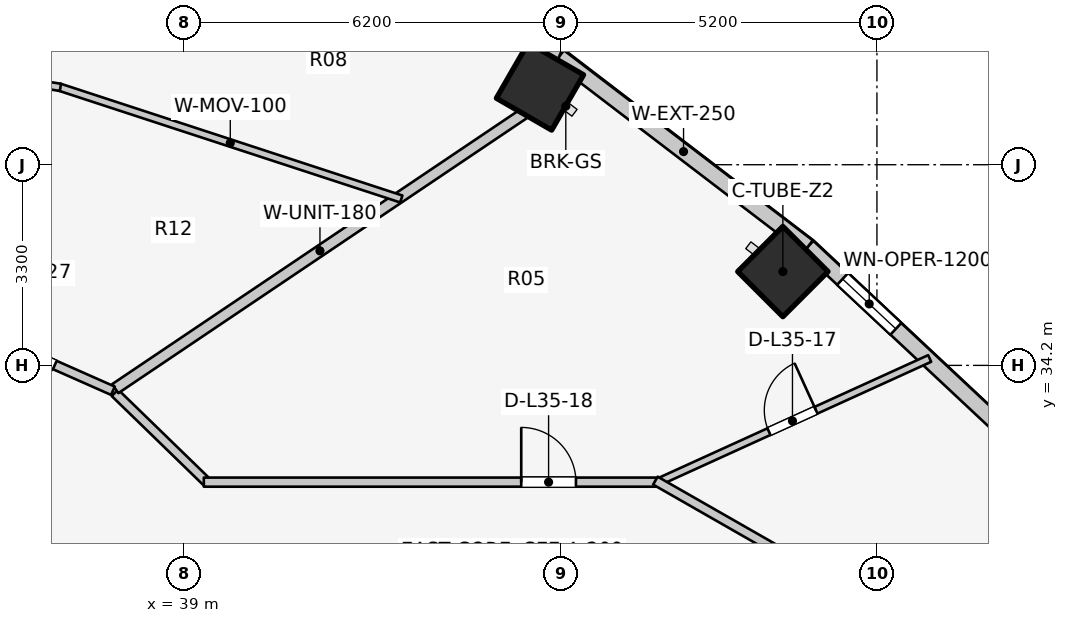
"""IFC4 building model, lengths in metres.
Left out: names, types, materials, properties, quantities, classifications, styles, units other than length and angle.
Written with IfcOpenShell. Run it as: python <this file> out.ifc"""

import sys

from ifc_helpers import new_model, si_unit, direction, frame, frame_2d, origin, origin_2d, place, context, subcontext, project, spatial, rectangle, extrude, element, fill, save


model = new_model("IFC4")
c1 = context("Model", 3, precision=1e-05, world=origin(), true_north=direction((0.0, 1.0)))
c2 = subcontext(c1, "Body", "Model", "MODEL_VIEW")
j1 = project(units=[si_unit("LENGTHUNIT", "METRE"), si_unit("PLANEANGLEUNIT", "RADIAN")], contexts=[c1])
p1 = place(None, origin())
s1 = spatial("IfcSite", under=j1, at=p1, CompositionType="ELEMENT")
p2 = place(p1, origin())
s2 = spatial("IfcBuilding", under=s1, at=p2, CompositionType="ELEMENT")
p3 = place(p2, frame((0.0, 0.0, 116.6)))
s3 = spatial("IfcBuildingStorey", under=s2, at=p3, CompositionType="ELEMENT", Elevation=116.6)
for number, where, z_axis, x_axis in (
    (1, (48.853, 35.743, 0.0), (0.0, 0.0, 1.0), (0.707, 0.707, 0.0)),
    (2, (44.858, 38.786, 0.0), (0.0, 0.0, 1.0), (0.5, 0.866, 0.0)),
):
    element("IfcColumn", number, at=place(p3, frame(where, z_axis=z_axis, x_axis=x_axis)), inside=s3, PredefinedType="COLUMN", context=c2, shape_type="SweptSolid", body=[
        extrude(rectangle(XDim=1.05, YDim=1.05, at=origin_2d()), origin(), (0.0, 0.0, 1.0), 3.1),
    ])
p4 = place(p3, frame((52.821, 32.827, 0.0), z_axis=(0.0, 0.0, 1.0), x_axis=(-0.730162452258, 0.68327358599, 0.0)))
e3 = element("IfcWall", 3, at=p4, inside=s3, PredefinedType="STANDARD", context=c2, shape_type="SweptSolid", body=[
    extrude(rectangle(XDim=4.868, YDim=0.26, at=frame_2d((2.434, 0.0))), origin(), (0.0, 0.0, 1.0), 2.85),
])
p5 = place(p4, frame((2.889, 0.0, 0.75)))
e4 = element("IfcOpeningElement", 4, at=p5, cuts=e3, PredefinedType="OPENING", context=c2, shape_type="SweptSolid", body=[
    extrude(rectangle(XDim=1.2, YDim=1.5, at=frame_2d((0.6, 0.75))), frame((0.0, 0.14, 0.0), z_axis=(0.0, -1.0, 0.0), x_axis=(1.0, 0.0, 0.0)), (0.0, 0.0, 1.0), 0.28),
])
p6 = place(p3, frame((49.266, 36.153, 0.0), z_axis=(0.0, 0.0, 1.0), x_axis=(-0.794809810864, 0.606858603427, 0.0)))
e5 = element("IfcWall", 5, at=p6, inside=s3, PredefinedType="STANDARD", context=c2, shape_type="SweptSolid", body=[
    extrude(rectangle(XDim=5.149, YDim=0.26, at=frame_2d((2.575, 0.0))), origin(), (0.0, 0.0, 1.0), 2.85),
])
p7 = place(p3, frame((45.173, 39.278, 0.0), z_axis=(0.0, 0.0, 1.0), x_axis=(-0.914336605747, 0.404955023911, 0.0)))
e6 = element("IfcWall", 6, at=p7, inside=s3, PredefinedType="STANDARD", context=c2, shape_type="SweptSolid", body=[
    extrude(rectangle(XDim=5.859, YDim=0.26, at=frame_2d((2.929, 0.0))), origin(), (0.0, 0.0, 1.0), 2.85),
])
p8 = place(p7, frame((1.729, 0.0, 0.75)))
e7 = element("IfcOpeningElement", 7, at=p8, cuts=e6, PredefinedType="OPENING", context=c2, shape_type="SweptSolid", body=[
    extrude(rectangle(XDim=2.4, YDim=1.7, at=frame_2d((1.2, 0.85))), frame((0.0, 0.14, 0.0), z_axis=(0.0, -1.0, 0.0), x_axis=(1.0, 0.0, 0.0)), (0.0, 0.0, 1.0), 0.28),
])
p9 = place(p3, frame((46.754, 32.259, 0.0), z_axis=(0.0, 0.0, 1.0), x_axis=(0.910140380276, 0.414299997817, 0.0)))
e8 = element("IfcWall", 8, at=p9, inside=s3, PredefinedType="MOVABLE", context=c2, shape_type="SweptSolid", body=[
    extrude(rectangle(XDim=4.958, YDim=0.12, at=frame_2d((2.479, 0.0))), origin(), (0.0, 0.0, 1.0), 2.142),
])
p10 = place(p9, frame((2.054, 0.0, 0.0)))
e9 = element("IfcOpeningElement", 9, at=p10, cuts=e8, PredefinedType="OPENING", context=c2, shape_type="SweptSolid", body=[
    extrude(rectangle(XDim=0.85, YDim=2.05, at=frame_2d((0.425, 1.025))), frame((0.0, 0.07, 0.0), z_axis=(0.0, -1.0, 0.0), x_axis=(1.0, 0.0, 0.0)), (0.0, 0.0, 1.0), 0.14),
])
p11 = place(p3, frame((37.867, 33.749, 0.0), z_axis=(0.0, 0.0, 1.0), x_axis=(0.717419568599, -0.696641344302, 0.0)))
e10 = element("IfcWall", 10, at=p11, inside=s3, PredefinedType="PARTITIONING", context=c2, shape_type="SweptSolid", body=[
    extrude(rectangle(XDim=2.138, YDim=0.15, at=frame_2d((1.069, 0.0))), origin(), (0.0, 0.0, 1.0), 2.272),
])
p12 = place(p3, frame((39.33, 32.28, 0.0), z_axis=(0.0, 0.0, 1.0), x_axis=(1.0, 0.0, 0.0)))
e11 = element("IfcWall", 11, at=p12, inside=s3, PredefinedType="PARTITIONING", context=c2, shape_type="SweptSolid", body=[
    extrude(rectangle(XDim=7.52, YDim=0.15, at=frame_2d((3.76, 0.0))), origin(), (0.0, 0.0, 1.0), 2.272),
])
p13 = place(p12, frame((5.22, 0.0, 0.0)))
e12 = element("IfcOpeningElement", 12, at=p13, cuts=e11, PredefinedType="OPENING", context=c2, shape_type="SweptSolid", body=[
    extrude(rectangle(XDim=0.9, YDim=2.1, at=frame_2d((0.45, 1.05))), frame((0.0, 0.085, 0.0), z_axis=(0.0, -1.0, 0.0), x_axis=(1.0, 0.0, 0.0)), (0.0, 0.0, 1.0), 0.17),
])
p14 = place(p3, frame((46.757, 32.305, 0.0), z_axis=(0.0, 0.0, 1.0), x_axis=(0.867991349648, -0.496579315857, 0.0)))
e13 = element("IfcWall", 13, at=p14, inside=s3, PredefinedType="PARTITIONING", context=c2, shape_type="SweptSolid", body=[
    extrude(rectangle(XDim=2.567, YDim=0.15, at=frame_2d((1.283, 0.0))), origin(), (0.0, 0.0, 1.0), 2.142),
])
p15 = place(p3, frame((37.874, 33.818, 0.0), z_axis=(0.0, 0.0, 1.0), x_axis=(0.829603023521, 0.558353672295, 0.0)))
e14 = element("IfcWall", 14, at=p15, inside=s3, PredefinedType="PARTITIONING", context=c2, shape_type="SweptSolid", body=[
    extrude(rectangle(XDim=8.115, YDim=0.18, at=frame_2d((4.058, 0.0))), origin(), (0.0, 0.0, 1.0), 2.272),
])
p16 = place(p3, frame((42.578, 36.937, 0.0), z_axis=(0.0, 0.0, 1.0), x_axis=(-0.950437911455, 0.310914419848, 0.0)))
e15 = element("IfcWall", 15, at=p16, inside=s3, PredefinedType="MOVABLE", context=c2, shape_type="SweptSolid", body=[
    extrude(rectangle(XDim=5.919, YDim=0.12, at=frame_2d((2.959, 0.0))), origin(), (0.0, 0.0, 1.0), 2.272),
])
p17 = place(p3, frame((36.971, 38.772, 0.0), z_axis=(0.0, 0.0, 1.0), x_axis=(-0.987600451088, 0.156988372215, 0.0)))
e16 = element("IfcWall", 16, at=p17, inside=s3, PredefinedType="MOVABLE", context=c2, shape_type="SweptSolid", body=[
    extrude(rectangle(XDim=5.084, YDim=0.12, at=frame_2d((2.542, 0.0))), origin(), (0.0, 0.0, 1.0), 2.272),
])
p18 = place(p17, frame((2.067, 0.0, 0.0)))
e17 = element("IfcOpeningElement", 17, at=p18, cuts=e16, PredefinedType="OPENING", context=c2, shape_type="SweptSolid", body=[
    extrude(rectangle(XDim=0.95, YDim=2.1, at=frame_2d((0.475, 1.05))), frame((0.0, 0.07, 0.0), z_axis=(0.0, -1.0, 0.0), x_axis=(1.0, 0.0, 0.0)), (0.0, 0.0, 1.0), 0.14),
])
p19 = place(p3, frame((37.835, 33.783, 0.0), z_axis=(0.0, 0.0, 1.0), x_axis=(-0.91445214467, 0.404694051239, 0.0)))
e18 = element("IfcWall", 18, at=p19, inside=s3, PredefinedType="PARTITIONING", context=c2, shape_type="SweptSolid", body=[
    extrude(rectangle(XDim=3.091, YDim=0.15, at=frame_2d((1.545, 0.0))), origin(), (0.0, 0.0, 1.0), 2.272),
])
p20 = place(p19, frame((1.045, 0.0, 0.0)))
e19 = element("IfcOpeningElement", 19, at=p20, cuts=e18, PredefinedType="OPENING", context=c2, shape_type="SweptSolid", body=[
    extrude(rectangle(XDim=1.0, YDim=2.1, at=frame_2d((0.5, 1.05))), frame((0.0, 0.085, 0.0), z_axis=(0.0, -1.0, 0.0), x_axis=(1.0, 0.0, 0.0)), (0.0, 0.0, 1.0), 0.17),
])
p21 = place(p5, origin())
e20 = element("IfcWindow", 20, at=p21, inside=s3, PartitioningType="SINGLE_PANEL", PredefinedType="WINDOW", context=c2, shape_type="SweptSolid", body=[
    extrude(rectangle(XDim=1.2, YDim=1.5, at=frame_2d((0.6, 0.75))), frame((0.0, 0.03, 0.0), z_axis=(0.0, -1.0, 0.0), x_axis=(1.0, 0.0, 0.0)), (0.0, 0.0, 1.0), 0.06),
])
fill(e4, e20)
p22 = place(p10, origin())
e21 = element("IfcDoor", 21, at=p22, inside=s3, OperationType="SINGLE_SWING_RIGHT", PredefinedType="DOOR", context=c2, shape_type="SweptSolid", body=[
    extrude(rectangle(XDim=0.85, YDim=2.05, at=frame_2d((0.425, 1.025))), frame((0.0, 0.025, 0.0), z_axis=(0.0, -1.0, 0.0), x_axis=(1.0, 0.0, 0.0)), (0.0, 0.0, 1.0), 0.05),
])
fill(e9, e21)
p23 = place(p13, origin())
e22 = element("IfcDoor", 22, at=p23, inside=s3, OperationType="SINGLE_SWING_LEFT", PredefinedType="DOOR", context=c2, shape_type="SweptSolid", body=[
    extrude(rectangle(XDim=0.9, YDim=2.1, at=frame_2d((0.45, 1.05))), frame((0.0, 0.025, 0.0), z_axis=(0.0, -1.0, 0.0), x_axis=(1.0, 0.0, 0.0)), (0.0, 0.0, 1.0), 0.05),
])
fill(e12, e22)
p24 = place(p20, origin())
e23 = element("IfcDoor", 23, at=p24, inside=s3, OperationType="SINGLE_SWING_RIGHT", PredefinedType="DOOR", context=c2, shape_type="SweptSolid", body=[
    extrude(rectangle(XDim=1.0, YDim=2.1, at=frame_2d((0.5, 1.05))), frame((0.0, 0.025, 0.0), z_axis=(0.0, -1.0, 0.0), x_axis=(1.0, 0.0, 0.0)), (0.0, 0.0, 1.0), 0.05),
])
fill(e19, e23)
save(model, sys.argv[1])
